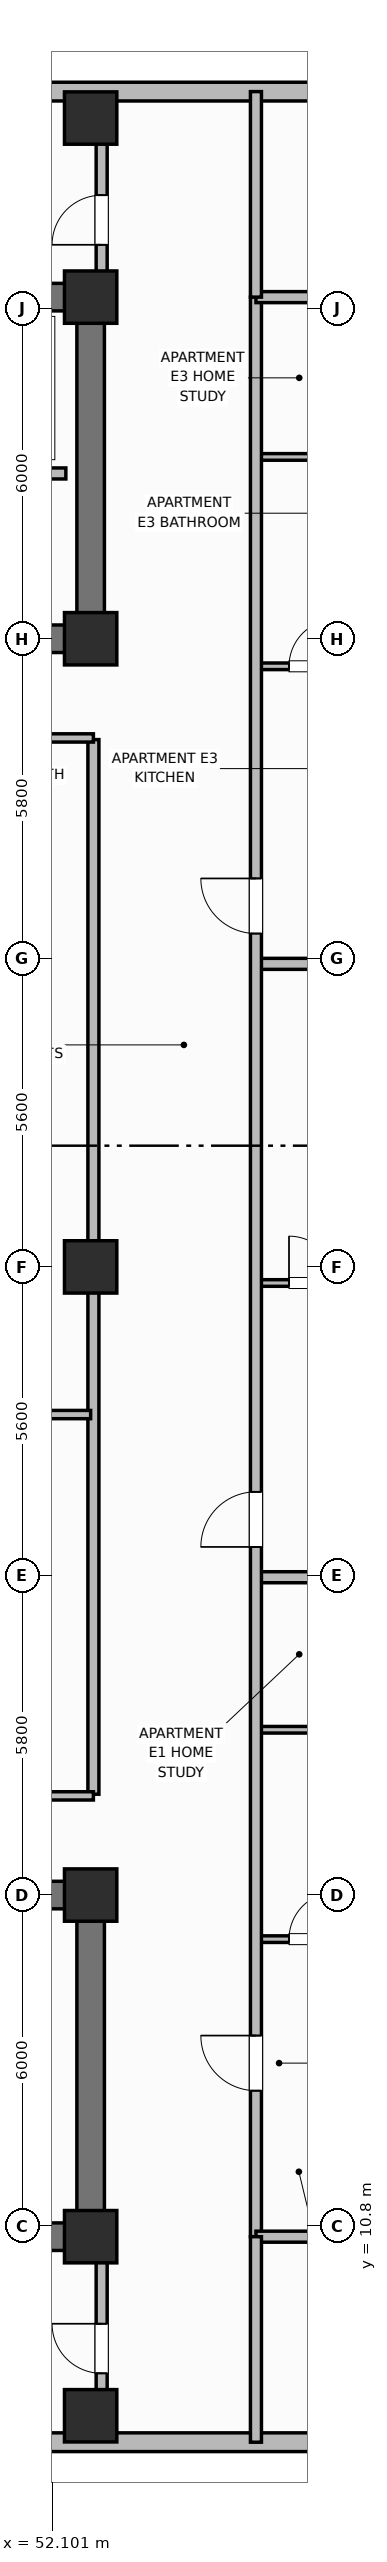
"""IFC4 building model, lengths in metres.
Left out: names, types, materials, properties, quantities, classifications, styles, units other than length and angle.
Written with IfcOpenShell. Run it as: python <this file> out.ifc"""

import sys

from ifc_helpers import new_model, si_unit, direction, frame, frame_2d, origin, origin_2d, place, context, subcontext, project, spatial, rectangle, extrude, element, fill, save


model = new_model("IFC4")
c1 = context("Model", 3, precision=1e-05, world=origin(), true_north=direction((0.0, 1.0)))
c2 = subcontext(c1, "Body", "Model", "MODEL_VIEW")
j1 = project(units=[si_unit("LENGTHUNIT", "METRE"), si_unit("PLANEANGLEUNIT", "RADIAN")], contexts=[c1])
p1 = place(None, origin())
s1 = spatial("IfcSite", under=j1, at=p1, CompositionType="ELEMENT")
p2 = place(p1, origin())
s2 = spatial("IfcBuilding", under=s1, at=p2, CompositionType="ELEMENT")
p3 = place(p2, frame((0.0, 0.0, 147.8)))
s3 = spatial("IfcBuildingStorey", under=s2, at=p3, CompositionType="ELEMENT", Elevation=147.8)
p4 = place(p3, frame((52.8, 10.6, 0.0), z_axis=(0.0, 0.0, 1.0), x_axis=(-1.0, 0.0, 0.0)))
e1 = element("IfcWall", 1, at=p4, inside=s3, PredefinedType="SHEAR", context=c2, shape_type="SweptSolid", body=[
    extrude(rectangle(XDim=27.2, YDim=0.5, at=frame_2d((13.6, 0.0))), origin(), (0.0, 0.0, 1.0), 3.7),
])
p5 = place(p3, frame((52.8, 10.85, 0.0), z_axis=(0.0, 0.0, 1.0), x_axis=(0.0, 1.0, 0.0)))
e2 = element("IfcWall", 2, at=p5, inside=s3, PredefinedType="SHEAR", context=c2, shape_type="SweptSolid", body=[
    extrude(rectangle(XDim=5.7, YDim=0.5, at=frame_2d((2.85, 0.0))), origin(), (0.0, 0.0, 1.0), 3.7),
])
p6 = place(p3, frame((25.6, 16.8, 0.0), z_axis=(0.0, 0.0, 1.0), x_axis=(1.0, 0.0, 0.0)))
e3 = element("IfcWall", 3, at=p6, inside=s3, PredefinedType="SHEAR", context=c2, shape_type="SweptSolid", body=[
    extrude(rectangle(XDim=27.2, YDim=0.5, at=frame_2d((13.6, 0.0))), origin(), (0.0, 0.0, 1.0), 3.7),
])
p7 = place(p6, frame((1.9, 0.0, 0.0)))
e4 = element("IfcOpeningElement", 4, at=p7, cuts=e3, PredefinedType="OPENING", context=c2, shape_type="SweptSolid", body=[
    extrude(rectangle(XDim=1.1, YDim=2.15, at=frame_2d((0.55, 1.075))), frame((0.0, 0.26, 0.0), z_axis=(0.0, -1.0, 0.0), x_axis=(1.0, 0.0, 0.0)), (0.0, 0.0, 1.0), 0.52),
])
p8 = place(p6, frame((13.0, 0.0, 0.0)))
e5 = element("IfcOpeningElement", 5, at=p8, cuts=e3, PredefinedType="OPENING", context=c2, shape_type="SweptSolid", body=[
    extrude(rectangle(XDim=1.2, YDim=2.15, at=frame_2d((0.6, 1.075))), frame((0.0, 0.26, 0.0), z_axis=(0.0, -1.0, 0.0), x_axis=(1.0, 0.0, 0.0)), (0.0, 0.0, 1.0), 0.52),
])
p9 = place(p6, frame((21.6, 0.0, 0.0)))
e6 = element("IfcOpeningElement", 6, at=p9, cuts=e3, PredefinedType="OPENING", context=c2, shape_type="SweptSolid", body=[
    extrude(rectangle(XDim=1.0, YDim=2.15, at=frame_2d((0.5, 1.075))), frame((0.0, 0.26, 0.0), z_axis=(0.0, -1.0, 0.0), x_axis=(1.0, 0.0, 0.0)), (0.0, 0.0, 1.0), 0.52),
])
p10 = place(p3, frame((25.6, 45.8, 0.0), z_axis=(0.0, 0.0, 1.0), x_axis=(1.0, 0.0, 0.0)))
e7 = element("IfcWall", 7, at=p10, inside=s3, PredefinedType="SHEAR", context=c2, shape_type="SweptSolid", body=[
    extrude(rectangle(XDim=27.2, YDim=0.5, at=frame_2d((13.6, 0.0))), origin(), (0.0, 0.0, 1.0), 3.7),
])
p11 = place(p3, frame((52.8, 39.85, 0.0), z_axis=(0.0, 0.0, 1.0), x_axis=(0.0, 1.0, 0.0)))
e8 = element("IfcWall", 8, at=p11, inside=s3, PredefinedType="SHEAR", context=c2, shape_type="SweptSolid", body=[
    extrude(rectangle(XDim=5.7, YDim=0.5, at=frame_2d((2.85, 0.0))), origin(), (0.0, 0.0, 1.0), 3.7),
])
p12 = place(p3, frame((52.8, 39.6, 0.0), z_axis=(0.0, 0.0, 1.0), x_axis=(-1.0, 0.0, 0.0)))
e9 = element("IfcWall", 9, at=p12, inside=s3, PredefinedType="SHEAR", context=c2, shape_type="SweptSolid", body=[
    extrude(rectangle(XDim=27.2, YDim=0.5, at=frame_2d((13.6, 0.0))), origin(), (0.0, 0.0, 1.0), 3.7),
])
p13 = place(p12, frame((24.2, 0.0, 0.0)))
e10 = element("IfcOpeningElement", 10, at=p13, cuts=e9, PredefinedType="OPENING", context=c2, shape_type="SweptSolid", body=[
    extrude(rectangle(XDim=1.1, YDim=2.15, at=frame_2d((0.55, 1.075))), frame((0.0, 0.26, 0.0), z_axis=(0.0, -1.0, 0.0), x_axis=(1.0, 0.0, 0.0)), (0.0, 0.0, 1.0), 0.52),
])
p14 = place(p12, frame((15.1, 0.0, 0.0)))
e11 = element("IfcOpeningElement", 11, at=p14, cuts=e9, PredefinedType="OPENING", context=c2, shape_type="SweptSolid", body=[
    extrude(rectangle(XDim=1.2, YDim=2.15, at=frame_2d((0.6, 1.075))), frame((0.0, 0.26, 0.0), z_axis=(0.0, -1.0, 0.0), x_axis=(1.0, 0.0, 0.0)), (0.0, 0.0, 1.0), 0.52),
])
p15 = place(p12, frame((11.6, 0.0, 0.0)))
e12 = element("IfcOpeningElement", 12, at=p15, cuts=e9, PredefinedType="OPENING", context=c2, shape_type="SweptSolid", body=[
    extrude(rectangle(XDim=0.9, YDim=2.1, at=frame_2d((0.45, 1.05))), frame((0.0, 0.26, 0.0), z_axis=(0.0, -1.0, 0.0), x_axis=(1.0, 0.0, 0.0)), (0.0, 0.0, 1.0), 0.52),
])
p16 = place(p12, frame((3.6, 0.0, 0.0)))
e13 = element("IfcOpeningElement", 13, at=p16, cuts=e9, PredefinedType="OPENING", context=c2, shape_type="SweptSolid", body=[
    extrude(rectangle(XDim=1.0, YDim=2.15, at=frame_2d((0.5, 1.075))), frame((0.0, 0.26, 0.0), z_axis=(0.0, -1.0, 0.0), x_axis=(1.0, 0.0, 0.0)), (0.0, 0.0, 1.0), 0.52),
])
for number, where, z_axis, x_axis in (
    (14, (52.8, 10.6, 0.0), (0.0, 0.0, 1.0), (1.0, 0.0, 0.0)),
    (15, (52.8, 16.8, 0.0), (0.0, 0.0, 1.0), (1.0, 0.0, 0.0)),
    (16, (52.8, 39.6, 0.0), (0.0, 0.0, 1.0), (1.0, 0.0, 0.0)),
    (17, (52.8, 45.8, 0.0), (0.0, 0.0, 1.0), (1.0, 0.0, 0.0)),
    (18, (52.8, 28.2, 0.0), (0.0, 0.0, 1.0), (1.0, 0.0, 0.0)),
    (19, (52.8, 7.35, 0.0), (0.0, 0.0, 1.0), (1.0, 0.0, 0.0)),
    (20, (52.8, 49.05, 0.0), (0.0, 0.0, 1.0), (1.0, 0.0, 0.0)),
):
    element("IfcColumn", number, at=place(p3, frame(where, z_axis=z_axis, x_axis=x_axis)), inside=s3, PredefinedType="COLUMN", context=c2, shape_type="SweptSolid", body=[
        extrude(rectangle(XDim=0.95, YDim=0.95, at=origin_2d()), origin(), (0.0, 0.0, 1.0), 3.7),
    ])
p17 = place(p3, frame((42.4, 6.87, 0.0), z_axis=(0.0, 0.0, 1.0), x_axis=(1.0, 0.0, 0.0)))
e21 = element("IfcWall", 21, at=p17, inside=s3, PredefinedType="SOLIDWALL", context=c2, shape_type="SweptSolid", body=[
    extrude(rectangle(XDim=15.8, YDim=0.34, at=frame_2d((7.9, 0.0))), origin(), (0.0, 0.0, 1.0), 2.72),
])
p18 = place(p17, frame((5.288, 0.0, 0.7)))
e22 = element("IfcOpeningElement", 22, at=p18, cuts=e21, PredefinedType="OPENING", context=c2, shape_type="SweptSolid", body=[
    extrude(rectangle(XDim=1.6, YDim=1.9, at=frame_2d((0.8, 0.95))), frame((0.0, 0.18, 0.0), z_axis=(0.0, -1.0, 0.0), x_axis=(1.0, 0.0, 0.0)), (0.0, 0.0, 1.0), 0.36),
])
p19 = place(p3, frame((58.2, 49.53, 0.0), z_axis=(0.0, 0.0, 1.0), x_axis=(-1.0, 0.0, 0.0)))
e23 = element("IfcWall", 23, at=p19, inside=s3, PredefinedType="SOLIDWALL", context=c2, shape_type="SweptSolid", body=[
    extrude(rectangle(XDim=15.8, YDim=0.34, at=frame_2d((7.9, 0.0))), origin(), (0.0, 0.0, 1.0), 2.72),
])
p20 = place(p19, frame((8.663, 0.0, 0.7)))
e24 = element("IfcOpeningElement", 24, at=p20, cuts=e23, PredefinedType="OPENING", context=c2, shape_type="SweptSolid", body=[
    extrude(rectangle(XDim=2.1, YDim=1.9, at=frame_2d((1.05, 0.95))), frame((0.0, 0.18, 0.0), z_axis=(0.0, -1.0, 0.0), x_axis=(1.0, 0.0, 0.0)), (0.0, 0.0, 1.0), 0.36),
])
p21 = place(p3, frame((52.35, 42.6, 0.0), z_axis=(0.0, 0.0, 1.0), x_axis=(-1.0, 0.0, 0.0)))
e25 = element("IfcWall", 25, at=p21, inside=s3, PredefinedType="PARTITIONING", context=c2, shape_type="SweptSolid", body=[
    extrude(rectangle(XDim=8.8, YDim=0.2, at=frame_2d((4.4, 0.0))), origin(), (0.0, 0.0, 1.0), 2.55),
])
p22 = place(p3, frame((52.85, 18.63, 0.0), z_axis=(0.0, 0.0, 1.0), x_axis=(0.0, 1.0, 0.0)))
e26 = element("IfcWall", 26, at=p22, inside=s3, PredefinedType="PARTITIONING", context=c2, shape_type="SweptSolid", body=[
    extrude(rectangle(XDim=19.14, YDim=0.2, at=frame_2d((9.57, 0.0))), origin(), (0.0, 0.0, 1.0), 2.55),
])
for number, where, z_axis, x_axis in (
    (27, (30.55, 18.6, 0.0), (0.0, 0.0, 1.0), (1.0, 0.0, 0.0)),
    (28, (30.55, 37.8, 0.0), (0.0, 0.0, 1.0), (1.0, 0.0, 0.0)),
):
    element("IfcWall", number, at=place(p3, frame(where, z_axis=z_axis, x_axis=x_axis)), inside=s3, PredefinedType="PARTITIONING", context=c2, shape_type="SweptSolid", body=[
        extrude(rectangle(XDim=22.3, YDim=0.15, at=frame_2d((11.15, 0.0))), origin(), (0.0, 0.0, 1.0), 2.55),
    ])
p23 = place(p3, frame((30.58, 25.521, 0.0), z_axis=(0.0, 0.0, 1.0), x_axis=(1.0, 0.0, 0.0)))
e29 = element("IfcWall", 29, at=p23, inside=s3, PredefinedType="PARTITIONING", context=c2, shape_type="SweptSolid", body=[
    extrude(rectangle(XDim=22.22, YDim=0.15, at=frame_2d((11.11, 0.0))), origin(), (0.0, 0.0, 1.0), 2.55),
])
p24 = place(p3, frame((55.8, 16.0, 0.0), z_axis=(0.0, 0.0, 1.0), x_axis=(1.0, 0.0, 0.0)))
e30 = element("IfcWall", 30, at=p24, inside=s3, PredefinedType="PARTITIONING", context=c2, shape_type="SweptSolid", body=[
    extrude(rectangle(XDim=2.25, YDim=0.12, at=frame_2d((1.125, 0.0))), origin(), (0.0, 0.0, 1.0), 2.55),
])
p25 = place(p24, frame((0.6, 0.0, 0.0)))
e31 = element("IfcOpeningElement", 31, at=p25, cuts=e30, PredefinedType="OPENING", context=c2, shape_type="SweptSolid", body=[
    extrude(rectangle(XDim=0.85, YDim=2.1, at=frame_2d((0.425, 1.05))), frame((0.0, 0.07, 0.0), z_axis=(0.0, -1.0, 0.0), x_axis=(1.0, 0.0, 0.0)), (0.0, 0.0, 1.0), 0.14),
])
p26 = place(p3, frame((55.8, 19.8, 0.0), z_axis=(0.0, 0.0, 1.0), x_axis=(1.0, 0.0, 0.0)))
e32 = element("IfcWall", 32, at=p26, inside=s3, PredefinedType="PARTITIONING", context=c2, shape_type="SweptSolid", body=[
    extrude(rectangle(XDim=2.25, YDim=0.12, at=frame_2d((1.125, 0.0))), origin(), (0.0, 0.0, 1.0), 2.55),
])
p27 = place(p3, frame((55.8, 22.568, 0.0), z_axis=(0.0, 0.0, 1.0), x_axis=(1.0, 0.0, 0.0)))
e33 = element("IfcWall", 33, at=p27, inside=s3, PredefinedType="PARTITIONING", context=c2, shape_type="SweptSolid", body=[
    extrude(rectangle(XDim=6.03, YDim=0.2, at=frame_2d((3.015, 0.0))), origin(), (0.0, 0.0, 1.0), 2.55),
])
p28 = place(p3, frame((55.8, 27.908, 0.0), z_axis=(0.0, 0.0, 1.0), x_axis=(1.0, 0.0, 0.0)))
e34 = element("IfcWall", 34, at=p28, inside=s3, PredefinedType="PARTITIONING", context=c2, shape_type="SweptSolid", body=[
    extrude(rectangle(XDim=2.25, YDim=0.12, at=frame_2d((1.125, 0.0))), origin(), (0.0, 0.0, 1.0), 2.55),
])
p29 = place(p28, frame((0.6, 0.0, 0.0)))
e35 = element("IfcOpeningElement", 35, at=p29, cuts=e34, PredefinedType="OPENING", context=c2, shape_type="SweptSolid", body=[
    extrude(rectangle(XDim=0.85, YDim=2.1, at=frame_2d((0.425, 1.05))), frame((0.0, 0.07, 0.0), z_axis=(0.0, -1.0, 0.0), x_axis=(1.0, 0.0, 0.0)), (0.0, 0.0, 1.0), 0.14),
])
p30 = place(p3, frame((55.8, 33.7, 0.0), z_axis=(0.0, 0.0, 1.0), x_axis=(1.0, 0.0, 0.0)))
e36 = element("IfcWall", 36, at=p30, inside=s3, PredefinedType="PARTITIONING", context=c2, shape_type="SweptSolid", body=[
    extrude(rectangle(XDim=6.03, YDim=0.2, at=frame_2d((3.015, 0.0))), origin(), (0.0, 0.0, 1.0), 2.55),
])
p31 = place(p3, frame((55.8, 39.1, 0.0), z_axis=(0.0, 0.0, 1.0), x_axis=(1.0, 0.0, 0.0)))
e37 = element("IfcWall", 37, at=p31, inside=s3, PredefinedType="PARTITIONING", context=c2, shape_type="SweptSolid", body=[
    extrude(rectangle(XDim=2.25, YDim=0.12, at=frame_2d((1.125, 0.0))), origin(), (0.0, 0.0, 1.0), 2.55),
])
p32 = place(p31, frame((0.6, 0.0, 0.0)))
e38 = element("IfcOpeningElement", 38, at=p32, cuts=e37, PredefinedType="OPENING", context=c2, shape_type="SweptSolid", body=[
    extrude(rectangle(XDim=0.85, YDim=2.1, at=frame_2d((0.425, 1.05))), frame((0.0, 0.07, 0.0), z_axis=(0.0, -1.0, 0.0), x_axis=(1.0, 0.0, 0.0)), (0.0, 0.0, 1.0), 0.14),
])
p33 = place(p3, frame((55.8, 42.9, 0.0), z_axis=(0.0, 0.0, 1.0), x_axis=(1.0, 0.0, 0.0)))
e39 = element("IfcWall", 39, at=p33, inside=s3, PredefinedType="PARTITIONING", context=c2, shape_type="SweptSolid", body=[
    extrude(rectangle(XDim=2.25, YDim=0.12, at=frame_2d((1.125, 0.0))), origin(), (0.0, 0.0, 1.0), 2.55),
])
p34 = place(p3, frame((55.8, 10.6, 0.0), z_axis=(0.0, 0.0, 1.0), x_axis=(0.0, 1.0, 0.0)))
e40 = element("IfcWall", 40, at=p34, inside=s3, PredefinedType="PARTITIONING", context=c2, shape_type="SweptSolid", body=[
    extrude(rectangle(XDim=35.2, YDim=0.2, at=frame_2d((17.6, 0.0))), origin(), (0.0, 0.0, 1.0), 2.55),
])
p35 = place(p34, frame((2.65, 0.0, 0.0)))
e41 = element("IfcOpeningElement", 41, at=p35, cuts=e40, PredefinedType="OPENING", context=c2, shape_type="SweptSolid", body=[
    extrude(rectangle(XDim=1.0, YDim=2.15, at=frame_2d((0.5, 1.075))), frame((0.0, 0.11, 0.0), z_axis=(0.0, -1.0, 0.0), x_axis=(1.0, 0.0, 0.0)), (0.0, 0.0, 1.0), 0.22),
])
p36 = place(p34, frame((12.518, 0.0, 0.0)))
e42 = element("IfcOpeningElement", 42, at=p36, cuts=e40, PredefinedType="OPENING", context=c2, shape_type="SweptSolid", body=[
    extrude(rectangle(XDim=1.0, YDim=2.15, at=frame_2d((0.5, 1.075))), frame((0.0, 0.11, 0.0), z_axis=(0.0, -1.0, 0.0), x_axis=(1.0, 0.0, 0.0)), (0.0, 0.0, 1.0), 0.22),
])
p37 = place(p34, frame((23.65, 0.0, 0.0)))
e43 = element("IfcOpeningElement", 43, at=p37, cuts=e40, PredefinedType="OPENING", context=c2, shape_type="SweptSolid", body=[
    extrude(rectangle(XDim=1.0, YDim=2.15, at=frame_2d((0.5, 1.075))), frame((0.0, 0.11, 0.0), z_axis=(0.0, -1.0, 0.0), x_axis=(1.0, 0.0, 0.0)), (0.0, 0.0, 1.0), 0.22),
])
for number, where, z_axis, x_axis in (
    (44, (55.8, 10.6, 0.0), (0.0, 0.0, 1.0), (1.0, 0.0, 0.0)),
    (45, (55.8, 45.8, 0.0), (0.0, 0.0, 1.0), (1.0, 0.0, 0.0)),
):
    element("IfcWall", number, at=place(p3, frame(where, z_axis=z_axis, x_axis=x_axis)), inside=s3, PredefinedType="PARTITIONING", context=c2, shape_type="SweptSolid", body=[
        extrude(rectangle(XDim=5.61, YDim=0.2, at=frame_2d((2.805, 0.0))), origin(), (0.0, 0.0, 1.0), 2.55),
    ])
for number, where, z_axis, x_axis in (
    (46, (55.8, 6.87, 0.0), (0.0, 0.0, 1.0), (0.0, 1.0, 0.0)),
    (47, (55.8, 45.8, 0.0), (0.0, 0.0, 1.0), (0.0, 1.0, 0.0)),
):
    element("IfcWall", number, at=place(p3, frame(where, z_axis=z_axis, x_axis=x_axis)), inside=s3, PredefinedType="PARTITIONING", context=c2, shape_type="SweptSolid", body=[
        extrude(rectangle(XDim=3.73, YDim=0.2, at=frame_2d((1.865, 0.0))), origin(), (0.0, 0.0, 1.0), 2.55),
    ])
p38 = place(p3, frame((53.0, 7.47, 0.0), z_axis=(0.0, 0.0, 1.0), x_axis=(0.0, 1.0, 0.0)))
e48 = element("IfcWall", 48, at=p38, inside=s3, PredefinedType="PARTITIONING", context=c2, shape_type="SweptSolid", body=[
    extrude(rectangle(XDim=2.83, YDim=0.2, at=frame_2d((1.415, 0.0))), origin(), (0.0, 0.0, 1.0), 2.55),
])
p39 = place(p38, frame((0.65, 0.0, 0.0)))
e49 = element("IfcOpeningElement", 49, at=p39, cuts=e48, PredefinedType="OPENING", context=c2, shape_type="SweptSolid", body=[
    extrude(rectangle(XDim=0.9, YDim=2.1, at=frame_2d((0.45, 1.05))), frame((0.0, 0.11, 0.0), z_axis=(0.0, -1.0, 0.0), x_axis=(1.0, 0.0, 0.0)), (0.0, 0.0, 1.0), 0.22),
])
p40 = place(p3, frame((53.0, 46.1, 0.0), z_axis=(0.0, 0.0, 1.0), x_axis=(0.0, 1.0, 0.0)))
e50 = element("IfcWall", 50, at=p40, inside=s3, PredefinedType="PARTITIONING", context=c2, shape_type="SweptSolid", body=[
    extrude(rectangle(XDim=2.83, YDim=0.2, at=frame_2d((1.415, 0.0))), origin(), (0.0, 0.0, 1.0), 2.55),
])
p41 = place(p40, frame((0.65, 0.0, 0.0)))
e51 = element("IfcOpeningElement", 51, at=p41, cuts=e50, PredefinedType="OPENING", context=c2, shape_type="SweptSolid", body=[
    extrude(rectangle(XDim=0.9, YDim=2.1, at=frame_2d((0.45, 1.05))), frame((0.0, 0.11, 0.0), z_axis=(0.0, -1.0, 0.0), x_axis=(1.0, 0.0, 0.0)), (0.0, 0.0, 1.0), 0.22),
])
p42 = place(p25, origin())
e52 = element("IfcDoor", 52, at=p42, inside=s3, OperationType="SINGLE_SWING_RIGHT", PredefinedType="DOOR", context=c2, shape_type="SweptSolid", body=[
    extrude(rectangle(XDim=0.85, YDim=2.1, at=frame_2d((0.425, 1.05))), frame((0.0, 0.025, 0.0), z_axis=(0.0, -1.0, 0.0), x_axis=(1.0, 0.0, 0.0)), (0.0, 0.0, 1.0), 0.05),
])
fill(e31, e52)
p43 = place(p29, origin())
e53 = element("IfcDoor", 53, at=p43, inside=s3, OperationType="SINGLE_SWING_LEFT", PredefinedType="DOOR", context=c2, shape_type="SweptSolid", body=[
    extrude(rectangle(XDim=0.85, YDim=2.1, at=frame_2d((0.425, 1.05))), frame((0.0, 0.025, 0.0), z_axis=(0.0, -1.0, 0.0), x_axis=(1.0, 0.0, 0.0)), (0.0, 0.0, 1.0), 0.05),
])
fill(e35, e53)
p44 = place(p32, origin())
e54 = element("IfcDoor", 54, at=p44, inside=s3, OperationType="SINGLE_SWING_RIGHT", PredefinedType="DOOR", context=c2, shape_type="SweptSolid", body=[
    extrude(rectangle(XDim=0.85, YDim=2.1, at=frame_2d((0.425, 1.05))), frame((0.0, 0.025, 0.0), z_axis=(0.0, -1.0, 0.0), x_axis=(1.0, 0.0, 0.0)), (0.0, 0.0, 1.0), 0.05),
])
fill(e38, e54)
p45 = place(p35, origin())
e55 = element("IfcDoor", 55, at=p45, inside=s3, OperationType="SINGLE_SWING_RIGHT", PredefinedType="DOOR", context=c2, shape_type="SweptSolid", body=[
    extrude(rectangle(XDim=1.0, YDim=2.15, at=frame_2d((0.5, 1.075))), frame((0.0, 0.025, 0.0), z_axis=(0.0, -1.0, 0.0), x_axis=(1.0, 0.0, 0.0)), (0.0, 0.0, 1.0), 0.05),
])
fill(e41, e55)
p46 = place(p36, origin())
e56 = element("IfcDoor", 56, at=p46, inside=s3, OperationType="SINGLE_SWING_LEFT", PredefinedType="DOOR", context=c2, shape_type="SweptSolid", body=[
    extrude(rectangle(XDim=1.0, YDim=2.15, at=frame_2d((0.5, 1.075))), frame((0.0, 0.025, 0.0), z_axis=(0.0, -1.0, 0.0), x_axis=(1.0, 0.0, 0.0)), (0.0, 0.0, 1.0), 0.05),
])
fill(e42, e56)
p47 = place(p37, origin())
e57 = element("IfcDoor", 57, at=p47, inside=s3, OperationType="SINGLE_SWING_RIGHT", PredefinedType="DOOR", context=c2, shape_type="SweptSolid", body=[
    extrude(rectangle(XDim=1.0, YDim=2.15, at=frame_2d((0.5, 1.075))), frame((0.0, 0.025, 0.0), z_axis=(0.0, -1.0, 0.0), x_axis=(1.0, 0.0, 0.0)), (0.0, 0.0, 1.0), 0.05),
])
fill(e43, e57)
p48 = place(p39, origin())
e58 = element("IfcDoor", 58, at=p48, inside=s3, OperationType="SINGLE_SWING_RIGHT", PredefinedType="DOOR", context=c2, shape_type="SweptSolid", body=[
    extrude(rectangle(XDim=0.9, YDim=2.1, at=frame_2d((0.45, 1.05))), frame((0.0, 0.025, 0.0), z_axis=(0.0, -1.0, 0.0), x_axis=(1.0, 0.0, 0.0)), (0.0, 0.0, 1.0), 0.05),
])
fill(e49, e58)
p49 = place(p41, origin())
e59 = element("IfcDoor", 59, at=p49, inside=s3, OperationType="SINGLE_SWING_LEFT", PredefinedType="DOOR", context=c2, shape_type="SweptSolid", body=[
    extrude(rectangle(XDim=0.9, YDim=2.1, at=frame_2d((0.45, 1.05))), frame((0.0, 0.025, 0.0), z_axis=(0.0, -1.0, 0.0), x_axis=(1.0, 0.0, 0.0)), (0.0, 0.0, 1.0), 0.05),
])
fill(e51, e59)
save(model, sys.argv[1])
